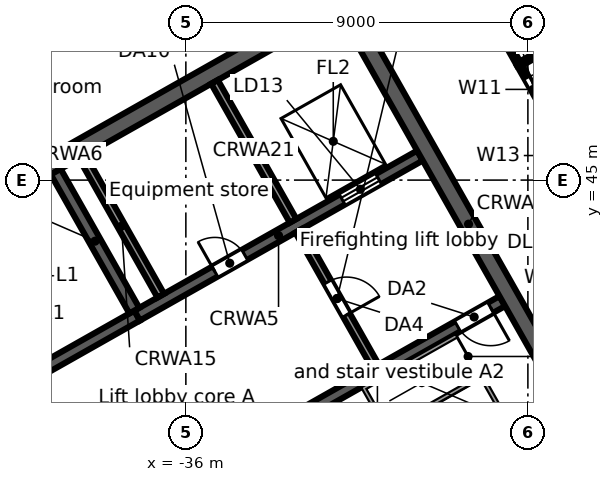
"""IFC4 building model, lengths in metres.
Left out: names, types, materials, properties, quantities, classifications, styles, units other than length and angle.
Written with IfcOpenShell. Run it as: python <this file> out.ifc"""

import sys

from ifc_helpers import new_model, si_unit, direction, frame, frame_2d, origin, place, context, subcontext, project, spatial, rectangle, extrude, element, fill, save


model = new_model("IFC4")
c1 = context("Model", 3, precision=1e-05, world=origin(), true_north=direction((0.0, 1.0)))
c2 = subcontext(c1, "Body", "Model", "MODEL_VIEW")
j1 = project(units=[si_unit("LENGTHUNIT", "METRE"), si_unit("PLANEANGLEUNIT", "RADIAN")], contexts=[c1])
p1 = place(None, origin())
s1 = spatial("IfcSite", under=j1, at=p1, CompositionType="ELEMENT")
p2 = place(p1, origin())
s2 = spatial("IfcBuilding", under=s1, at=p2, CompositionType="ELEMENT")
p3 = place(p2, frame((0.0, 0.0, 219.2)))
s3 = spatial("IfcBuildingStorey", under=s2, at=p3, CompositionType="ELEMENT", Elevation=219.2)
p4 = place(p3, frame((-0.046, 47.974, 0.0), z_axis=(0.0, 0.0, 1.0), x_axis=(-0.870356579543, -0.492421998337, 0.0)))
e1 = element("IfcWall", 1, at=p4, inside=s3, PredefinedType="STANDARD", context=c2, shape_type="SweptSolid", body=[
    extrude(rectangle(XDim=43.754, YDim=0.25, at=frame_2d((21.877, 0.0))), origin(), (0.0, 0.0, 1.0), 3.62),
])
p5 = place(p4, frame((41.061, 0.0, 0.8)))
e2 = element("IfcOpeningElement", 2, at=p5, cuts=e1, PredefinedType="OPENING", context=c2, shape_type="SweptSolid", body=[
    extrude(rectangle(XDim=2.4, YDim=2.2, at=frame_2d((1.2, 1.1))), frame((0.0, 0.135, 0.0), z_axis=(0.0, -1.0, 0.0), x_axis=(1.0, 0.0, 0.0)), (0.0, 0.0, 1.0), 0.27),
])
p6 = place(p4, frame((38.443, 0.0, 0.0)))
e3 = element("IfcOpeningElement", 3, at=p6, cuts=e1, PredefinedType="OPENING", context=c2, shape_type="SweptSolid", body=[
    extrude(rectangle(XDim=1.8, YDim=2.4, at=frame_2d((0.9, 1.2))), frame((0.0, 0.135, 0.0), z_axis=(0.0, -1.0, 0.0), x_axis=(1.0, 0.0, 0.0)), (0.0, 0.0, 1.0), 0.27),
])
p7 = place(p4, frame((35.225, 0.0, 0.8)))
e4 = element("IfcOpeningElement", 4, at=p7, cuts=e1, PredefinedType="OPENING", context=c2, shape_type="SweptSolid", body=[
    extrude(rectangle(XDim=2.4, YDim=2.2, at=frame_2d((1.2, 1.1))), frame((0.0, 0.135, 0.0), z_axis=(0.0, -1.0, 0.0), x_axis=(1.0, 0.0, 0.0)), (0.0, 0.0, 1.0), 0.27),
])
p8 = place(p4, frame((32.307, 0.0, 0.8)))
e5 = element("IfcOpeningElement", 5, at=p8, cuts=e1, PredefinedType="OPENING", context=c2, shape_type="SweptSolid", body=[
    extrude(rectangle(XDim=2.4, YDim=2.2, at=frame_2d((1.2, 1.1))), frame((0.0, 0.135, 0.0), z_axis=(0.0, -1.0, 0.0), x_axis=(1.0, 0.0, 0.0)), (0.0, 0.0, 1.0), 0.27),
])
p9 = place(p4, frame((29.688, 0.0, 0.0)))
e6 = element("IfcOpeningElement", 6, at=p9, cuts=e1, PredefinedType="OPENING", context=c2, shape_type="SweptSolid", body=[
    extrude(rectangle(XDim=1.8, YDim=2.4, at=frame_2d((0.9, 1.2))), frame((0.0, 0.135, 0.0), z_axis=(0.0, -1.0, 0.0), x_axis=(1.0, 0.0, 0.0)), (0.0, 0.0, 1.0), 0.27),
])
p10 = place(p4, frame((26.47, 0.0, 0.8)))
e7 = element("IfcOpeningElement", 7, at=p10, cuts=e1, PredefinedType="OPENING", context=c2, shape_type="SweptSolid", body=[
    extrude(rectangle(XDim=2.4, YDim=2.2, at=frame_2d((1.2, 1.1))), frame((0.0, 0.135, 0.0), z_axis=(0.0, -1.0, 0.0), x_axis=(1.0, 0.0, 0.0)), (0.0, 0.0, 1.0), 0.27),
])
p11 = place(p4, frame((23.552, 0.0, 0.8)))
e8 = element("IfcOpeningElement", 8, at=p11, cuts=e1, PredefinedType="OPENING", context=c2, shape_type="SweptSolid", body=[
    extrude(rectangle(XDim=2.4, YDim=2.2, at=frame_2d((1.2, 1.1))), frame((0.0, 0.135, 0.0), z_axis=(0.0, -1.0, 0.0), x_axis=(1.0, 0.0, 0.0)), (0.0, 0.0, 1.0), 0.27),
])
p12 = place(p4, frame((20.934, 0.0, 0.0)))
e9 = element("IfcOpeningElement", 9, at=p12, cuts=e1, PredefinedType="OPENING", context=c2, shape_type="SweptSolid", body=[
    extrude(rectangle(XDim=1.8, YDim=2.4, at=frame_2d((0.9, 1.2))), frame((0.0, 0.135, 0.0), z_axis=(0.0, -1.0, 0.0), x_axis=(1.0, 0.0, 0.0)), (0.0, 0.0, 1.0), 0.27),
])
p13 = place(p4, frame((17.716, 0.0, 0.8)))
e10 = element("IfcOpeningElement", 10, at=p13, cuts=e1, PredefinedType="OPENING", context=c2, shape_type="SweptSolid", body=[
    extrude(rectangle(XDim=2.4, YDim=2.2, at=frame_2d((1.2, 1.1))), frame((0.0, 0.135, 0.0), z_axis=(0.0, -1.0, 0.0), x_axis=(1.0, 0.0, 0.0)), (0.0, 0.0, 1.0), 0.27),
])
p14 = place(p4, frame((14.798, 0.0, 0.8)))
e11 = element("IfcOpeningElement", 11, at=p14, cuts=e1, PredefinedType="OPENING", context=c2, shape_type="SweptSolid", body=[
    extrude(rectangle(XDim=2.4, YDim=2.2, at=frame_2d((1.2, 1.1))), frame((0.0, 0.135, 0.0), z_axis=(0.0, -1.0, 0.0), x_axis=(1.0, 0.0, 0.0)), (0.0, 0.0, 1.0), 0.27),
])
p15 = place(p4, frame((12.179, 0.0, 0.0)))
e12 = element("IfcOpeningElement", 12, at=p15, cuts=e1, PredefinedType="OPENING", context=c2, shape_type="SweptSolid", body=[
    extrude(rectangle(XDim=1.8, YDim=2.4, at=frame_2d((0.9, 1.2))), frame((0.0, 0.135, 0.0), z_axis=(0.0, -1.0, 0.0), x_axis=(1.0, 0.0, 0.0)), (0.0, 0.0, 1.0), 0.27),
])
p16 = place(p4, frame((8.961, 0.0, 0.8)))
e13 = element("IfcOpeningElement", 13, at=p16, cuts=e1, PredefinedType="OPENING", context=c2, shape_type="SweptSolid", body=[
    extrude(rectangle(XDim=2.4, YDim=2.2, at=frame_2d((1.2, 1.1))), frame((0.0, 0.135, 0.0), z_axis=(0.0, -1.0, 0.0), x_axis=(1.0, 0.0, 0.0)), (0.0, 0.0, 1.0), 0.27),
])
p17 = place(p4, frame((6.043, 0.0, 0.8)))
e14 = element("IfcOpeningElement", 14, at=p17, cuts=e1, PredefinedType="OPENING", context=c2, shape_type="SweptSolid", body=[
    extrude(rectangle(XDim=2.4, YDim=2.2, at=frame_2d((1.2, 1.1))), frame((0.0, 0.135, 0.0), z_axis=(0.0, -1.0, 0.0), x_axis=(1.0, 0.0, 0.0)), (0.0, 0.0, 1.0), 0.27),
])
p18 = place(p4, frame((3.425, 0.0, 0.0)))
e15 = element("IfcOpeningElement", 15, at=p18, cuts=e1, PredefinedType="OPENING", context=c2, shape_type="SweptSolid", body=[
    extrude(rectangle(XDim=1.8, YDim=2.4, at=frame_2d((0.9, 1.2))), frame((0.0, 0.135, 0.0), z_axis=(0.0, -1.0, 0.0), x_axis=(1.0, 0.0, 0.0)), (0.0, 0.0, 1.0), 0.27),
])
p19 = place(p4, frame((0.207, 0.0, 0.8)))
e16 = element("IfcOpeningElement", 16, at=p19, cuts=e1, PredefinedType="OPENING", context=c2, shape_type="SweptSolid", body=[
    extrude(rectangle(XDim=2.4, YDim=2.2, at=frame_2d((1.2, 1.1))), frame((0.0, 0.135, 0.0), z_axis=(0.0, -1.0, 0.0), x_axis=(1.0, 0.0, 0.0)), (0.0, 0.0, 1.0), 0.27),
])
p20 = place(p3, frame((-58.732, 38.771, 0.0), z_axis=(0.0, 0.0, 1.0), x_axis=(0.870354824205, 0.492425100887, 0.0)))
e17 = element("IfcWall", 17, at=p20, inside=s3, PredefinedType="STANDARD", context=c2, shape_type="SweptSolid", body=[
    extrude(rectangle(XDim=64.006, YDim=0.25, at=frame_2d((32.003, 0.0))), origin(), (0.0, 0.0, 1.0), 3.62),
])
p21 = place(p20, frame((61.259, 0.0, 0.8)))
e18 = element("IfcOpeningElement", 18, at=p21, cuts=e17, PredefinedType="OPENING", context=c2, shape_type="SweptSolid", body=[
    extrude(rectangle(XDim=2.4, YDim=2.2, at=frame_2d((1.2, 1.1))), frame((0.0, 0.135, 0.0), z_axis=(0.0, -1.0, 0.0), x_axis=(1.0, 0.0, 0.0)), (0.0, 0.0, 1.0), 0.27),
])
p22 = place(p20, frame((58.216, 0.0, 0.8)))
e19 = element("IfcOpeningElement", 19, at=p22, cuts=e17, PredefinedType="OPENING", context=c2, shape_type="SweptSolid", body=[
    extrude(rectangle(XDim=2.4, YDim=2.2, at=frame_2d((1.2, 1.1))), frame((0.0, 0.135, 0.0), z_axis=(0.0, -1.0, 0.0), x_axis=(1.0, 0.0, 0.0)), (0.0, 0.0, 1.0), 0.27),
])
p23 = place(p20, frame((55.173, 0.0, 0.8)))
e20 = element("IfcOpeningElement", 20, at=p23, cuts=e17, PredefinedType="OPENING", context=c2, shape_type="SweptSolid", body=[
    extrude(rectangle(XDim=2.4, YDim=2.2, at=frame_2d((1.2, 1.1))), frame((0.0, 0.135, 0.0), z_axis=(0.0, -1.0, 0.0), x_axis=(1.0, 0.0, 0.0)), (0.0, 0.0, 1.0), 0.27),
])
p24 = place(p20, frame((52.129, 0.0, 0.8)))
e21 = element("IfcOpeningElement", 21, at=p24, cuts=e17, PredefinedType="OPENING", context=c2, shape_type="SweptSolid", body=[
    extrude(rectangle(XDim=2.4, YDim=2.2, at=frame_2d((1.2, 1.1))), frame((0.0, 0.135, 0.0), z_axis=(0.0, -1.0, 0.0), x_axis=(1.0, 0.0, 0.0)), (0.0, 0.0, 1.0), 0.27),
])
p25 = place(p20, frame((49.086, 0.0, 0.8)))
e22 = element("IfcOpeningElement", 22, at=p25, cuts=e17, PredefinedType="OPENING", context=c2, shape_type="SweptSolid", body=[
    extrude(rectangle(XDim=2.4, YDim=2.2, at=frame_2d((1.2, 1.1))), frame((0.0, 0.135, 0.0), z_axis=(0.0, -1.0, 0.0), x_axis=(1.0, 0.0, 0.0)), (0.0, 0.0, 1.0), 0.27),
])
p26 = place(p20, frame((46.043, 0.0, 0.8)))
e23 = element("IfcOpeningElement", 23, at=p26, cuts=e17, PredefinedType="OPENING", context=c2, shape_type="SweptSolid", body=[
    extrude(rectangle(XDim=2.4, YDim=2.2, at=frame_2d((1.2, 1.1))), frame((0.0, 0.135, 0.0), z_axis=(0.0, -1.0, 0.0), x_axis=(1.0, 0.0, 0.0)), (0.0, 0.0, 1.0), 0.27),
])
p27 = place(p20, frame((43.0, 0.0, 0.8)))
e24 = element("IfcOpeningElement", 24, at=p27, cuts=e17, PredefinedType="OPENING", context=c2, shape_type="SweptSolid", body=[
    extrude(rectangle(XDim=2.4, YDim=2.2, at=frame_2d((1.2, 1.1))), frame((0.0, 0.135, 0.0), z_axis=(0.0, -1.0, 0.0), x_axis=(1.0, 0.0, 0.0)), (0.0, 0.0, 1.0), 0.27),
])
p28 = place(p20, frame((39.956, 0.0, 0.8)))
e25 = element("IfcOpeningElement", 25, at=p28, cuts=e17, PredefinedType="OPENING", context=c2, shape_type="SweptSolid", body=[
    extrude(rectangle(XDim=2.4, YDim=2.2, at=frame_2d((1.2, 1.1))), frame((0.0, 0.135, 0.0), z_axis=(0.0, -1.0, 0.0), x_axis=(1.0, 0.0, 0.0)), (0.0, 0.0, 1.0), 0.27),
])
p29 = place(p20, frame((36.913, 0.0, 0.8)))
e26 = element("IfcOpeningElement", 26, at=p29, cuts=e17, PredefinedType="OPENING", context=c2, shape_type="SweptSolid", body=[
    extrude(rectangle(XDim=2.4, YDim=2.2, at=frame_2d((1.2, 1.1))), frame((0.0, 0.135, 0.0), z_axis=(0.0, -1.0, 0.0), x_axis=(1.0, 0.0, 0.0)), (0.0, 0.0, 1.0), 0.27),
])
p30 = place(p20, frame((33.87, 0.0, 0.8)))
e27 = element("IfcOpeningElement", 27, at=p30, cuts=e17, PredefinedType="OPENING", context=c2, shape_type="SweptSolid", body=[
    extrude(rectangle(XDim=2.4, YDim=2.2, at=frame_2d((1.2, 1.1))), frame((0.0, 0.135, 0.0), z_axis=(0.0, -1.0, 0.0), x_axis=(1.0, 0.0, 0.0)), (0.0, 0.0, 1.0), 0.27),
])
p31 = place(p20, frame((30.826, 0.0, 0.8)))
e28 = element("IfcOpeningElement", 28, at=p31, cuts=e17, PredefinedType="OPENING", context=c2, shape_type="SweptSolid", body=[
    extrude(rectangle(XDim=2.4, YDim=2.2, at=frame_2d((1.2, 1.1))), frame((0.0, 0.135, 0.0), z_axis=(0.0, -1.0, 0.0), x_axis=(1.0, 0.0, 0.0)), (0.0, 0.0, 1.0), 0.27),
])
p32 = place(p20, frame((27.783, 0.0, 0.8)))
e29 = element("IfcOpeningElement", 29, at=p32, cuts=e17, PredefinedType="OPENING", context=c2, shape_type="SweptSolid", body=[
    extrude(rectangle(XDim=2.4, YDim=2.2, at=frame_2d((1.2, 1.1))), frame((0.0, 0.135, 0.0), z_axis=(0.0, -1.0, 0.0), x_axis=(1.0, 0.0, 0.0)), (0.0, 0.0, 1.0), 0.27),
])
p33 = place(p20, frame((24.74, 0.0, 0.8)))
e30 = element("IfcOpeningElement", 30, at=p33, cuts=e17, PredefinedType="OPENING", context=c2, shape_type="SweptSolid", body=[
    extrude(rectangle(XDim=2.4, YDim=2.2, at=frame_2d((1.2, 1.1))), frame((0.0, 0.135, 0.0), z_axis=(0.0, -1.0, 0.0), x_axis=(1.0, 0.0, 0.0)), (0.0, 0.0, 1.0), 0.27),
])
p34 = place(p20, frame((21.696, 0.0, 0.8)))
e31 = element("IfcOpeningElement", 31, at=p34, cuts=e17, PredefinedType="OPENING", context=c2, shape_type="SweptSolid", body=[
    extrude(rectangle(XDim=2.4, YDim=2.2, at=frame_2d((1.2, 1.1))), frame((0.0, 0.135, 0.0), z_axis=(0.0, -1.0, 0.0), x_axis=(1.0, 0.0, 0.0)), (0.0, 0.0, 1.0), 0.27),
])
p35 = place(p20, frame((18.653, 0.0, 0.8)))
e32 = element("IfcOpeningElement", 32, at=p35, cuts=e17, PredefinedType="OPENING", context=c2, shape_type="SweptSolid", body=[
    extrude(rectangle(XDim=2.4, YDim=2.2, at=frame_2d((1.2, 1.1))), frame((0.0, 0.135, 0.0), z_axis=(0.0, -1.0, 0.0), x_axis=(1.0, 0.0, 0.0)), (0.0, 0.0, 1.0), 0.27),
])
p36 = place(p20, frame((15.61, 0.0, 0.8)))
e33 = element("IfcOpeningElement", 33, at=p36, cuts=e17, PredefinedType="OPENING", context=c2, shape_type="SweptSolid", body=[
    extrude(rectangle(XDim=2.4, YDim=2.2, at=frame_2d((1.2, 1.1))), frame((0.0, 0.135, 0.0), z_axis=(0.0, -1.0, 0.0), x_axis=(1.0, 0.0, 0.0)), (0.0, 0.0, 1.0), 0.27),
])
p37 = place(p20, frame((12.567, 0.0, 0.8)))
e34 = element("IfcOpeningElement", 34, at=p37, cuts=e17, PredefinedType="OPENING", context=c2, shape_type="SweptSolid", body=[
    extrude(rectangle(XDim=2.4, YDim=2.2, at=frame_2d((1.2, 1.1))), frame((0.0, 0.135, 0.0), z_axis=(0.0, -1.0, 0.0), x_axis=(1.0, 0.0, 0.0)), (0.0, 0.0, 1.0), 0.27),
])
p38 = place(p20, frame((9.523, 0.0, 0.8)))
e35 = element("IfcOpeningElement", 35, at=p38, cuts=e17, PredefinedType="OPENING", context=c2, shape_type="SweptSolid", body=[
    extrude(rectangle(XDim=2.4, YDim=2.2, at=frame_2d((1.2, 1.1))), frame((0.0, 0.135, 0.0), z_axis=(0.0, -1.0, 0.0), x_axis=(1.0, 0.0, 0.0)), (0.0, 0.0, 1.0), 0.27),
])
p39 = place(p20, frame((6.48, 0.0, 0.8)))
e36 = element("IfcOpeningElement", 36, at=p39, cuts=e17, PredefinedType="OPENING", context=c2, shape_type="SweptSolid", body=[
    extrude(rectangle(XDim=2.4, YDim=2.2, at=frame_2d((1.2, 1.1))), frame((0.0, 0.135, 0.0), z_axis=(0.0, -1.0, 0.0), x_axis=(1.0, 0.0, 0.0)), (0.0, 0.0, 1.0), 0.27),
])
p40 = place(p20, frame((3.437, 0.0, 0.8)))
e37 = element("IfcOpeningElement", 37, at=p40, cuts=e17, PredefinedType="OPENING", context=c2, shape_type="SweptSolid", body=[
    extrude(rectangle(XDim=2.4, YDim=2.2, at=frame_2d((1.2, 1.1))), frame((0.0, 0.135, 0.0), z_axis=(0.0, -1.0, 0.0), x_axis=(1.0, 0.0, 0.0)), (0.0, 0.0, 1.0), 0.27),
])
p41 = place(p20, frame((0.393, 0.0, 0.8)))
e38 = element("IfcOpeningElement", 38, at=p41, cuts=e17, PredefinedType="OPENING", context=c2, shape_type="SweptSolid", body=[
    extrude(rectangle(XDim=2.4, YDim=2.2, at=frame_2d((1.2, 1.1))), frame((0.0, 0.135, 0.0), z_axis=(0.0, -1.0, 0.0), x_axis=(1.0, 0.0, 0.0)), (0.0, 0.0, 1.0), 0.27),
])
p42 = place(p3, frame((-34.245, 38.097, 0.0), z_axis=(0.0, 0.0, 1.0), x_axis=(0.870360409231, 0.492415229297, 0.0)))
e39 = element("IfcWall", 39, at=p42, inside=s3, PredefinedType="SOLIDWALL", context=c2, shape_type="SweptSolid", body=[
    extrude(rectangle(XDim=7.55, YDim=0.3, at=frame_2d((3.775, 0.0))), origin(), (0.0, 0.0, 1.0), 3.62),
])
p43 = place(p42, frame((6.2, 0.0, 0.0)))
e40 = element("IfcOpeningElement", 40, at=p43, cuts=e39, PredefinedType="OPENING", context=c2, shape_type="SweptSolid", body=[
    extrude(rectangle(XDim=1.0, YDim=2.1, at=frame_2d((0.5, 1.05))), frame((0.0, 0.16, 0.0), z_axis=(0.0, -1.0, 0.0), x_axis=(1.0, 0.0, 0.0)), (0.0, 0.0, 1.0), 0.32),
])
p44 = place(p3, frame((-43.853, 37.717, 0.0), z_axis=(0.0, 0.0, 1.0), x_axis=(0.870360409231, 0.492415229297, 0.0)))
e41 = element("IfcWall", 41, at=p44, inside=s3, PredefinedType="SOLIDWALL", context=c2, shape_type="SweptSolid", body=[
    extrude(rectangle(XDim=7.55, YDim=0.3, at=frame_2d((3.775, 0.0))), origin(), (0.0, 0.0, 1.0), 3.62),
])
p45 = place(p44, frame((0.35, 0.0, 0.0)))
e42 = element("IfcOpeningElement", 42, at=p45, cuts=e41, PredefinedType="OPENING", context=c2, shape_type="SweptSolid", body=[
    extrude(rectangle(XDim=1.0, YDim=2.1, at=frame_2d((0.5, 1.05))), frame((0.0, 0.16, 0.0), z_axis=(0.0, -1.0, 0.0), x_axis=(1.0, 0.0, 0.0)), (0.0, 0.0, 1.0), 0.32),
])
p46 = place(p3, frame((-37.282, 41.435, 0.0), z_axis=(0.0, 0.0, 1.0), x_axis=(0.870352688754, 0.492428875248, 0.0)))
e43 = element("IfcWall", 43, at=p46, inside=s3, PredefinedType="SOLIDWALL", context=c2, shape_type="SweptSolid", body=[
    extrude(rectangle(XDim=8.55, YDim=0.3, at=frame_2d((4.275, 0.0))), origin(), (0.0, 0.0, 1.0), 3.62),
])
p47 = place(p46, frame((6.2, 0.0, 0.0)))
e44 = element("IfcOpeningElement", 44, at=p47, cuts=e43, PredefinedType="OPENING", context=c2, shape_type="SweptSolid", body=[
    extrude(rectangle(XDim=1.1, YDim=2.1, at=frame_2d((0.55, 1.05))), frame((0.0, 0.16, 0.0), z_axis=(0.0, -1.0, 0.0), x_axis=(1.0, 0.0, 0.0)), (0.0, 0.0, 1.0), 0.32),
])
p48 = place(p46, frame((2.35, 0.0, 0.0)))
e45 = element("IfcOpeningElement", 45, at=p48, cuts=e43, PredefinedType="OPENING", context=c2, shape_type="SweptSolid", body=[
    extrude(rectangle(XDim=0.9, YDim=2.1, at=frame_2d((0.45, 1.05))), frame((0.0, 0.16, 0.0), z_axis=(0.0, -1.0, 0.0), x_axis=(1.0, 0.0, 0.0)), (0.0, 0.0, 1.0), 0.32),
])
p49 = place(p3, frame((-46.498, 41.477, 0.0), z_axis=(0.0, 0.0, 1.0), x_axis=(0.870359753402, 0.492416388494, 0.0)))
e46 = element("IfcWall", 46, at=p49, inside=s3, PredefinedType="SOLIDWALL", context=c2, shape_type="SweptSolid", body=[
    extrude(rectangle(XDim=17.0, YDim=0.45, at=frame_2d((8.5, 0.0))), origin(), (0.0, 0.0, 1.0), 3.62),
])
p50 = place(p3, frame((-40.516, 39.433, 0.0), z_axis=(0.0, 0.0, 1.0), x_axis=(0.492453559952, -0.87033872216, 0.0)))
e47 = element("IfcWall", 47, at=p50, inside=s3, PredefinedType="PARTITIONING", context=c2, shape_type="SweptSolid", body=[
    extrude(rectangle(XDim=4.1, YDim=0.2, at=frame_2d((2.05, 0.0))), origin(), (0.0, 0.0, 1.0), 3.62),
])
p51 = place(p50, frame((1.55, 0.0, 0.0)))
e48 = element("IfcOpeningElement", 48, at=p51, cuts=e47, PredefinedType="OPENING", context=c2, shape_type="SweptSolid", body=[
    extrude(rectangle(XDim=1.0, YDim=2.1, at=frame_2d((0.5, 1.05))), frame((0.0, 0.11, 0.0), z_axis=(0.0, -1.0, 0.0), x_axis=(1.0, 0.0, 0.0)), (0.0, 0.0, 1.0), 0.22),
])
p52 = place(p3, frame((-39.424, 45.22, 0.0), z_axis=(0.0, 0.0, 1.0), x_axis=(0.492409653846, -0.870363563575, 0.0)))
e49 = element("IfcWall", 49, at=p52, inside=s3, PredefinedType="SOLIDWALL", context=c2, shape_type="SweptSolid", body=[
    extrude(rectangle(XDim=4.2, YDim=0.3, at=frame_2d((2.1, 0.0))), origin(), (0.0, 0.0, 1.0), 3.62),
])
p53 = place(p3, frame((-38.728, 45.615, 0.0), z_axis=(0.0, 0.0, 1.0), x_axis=(0.492409653846, -0.870363563575, 0.0)))
e50 = element("IfcWall", 50, at=p53, inside=s3, PredefinedType="SOLIDWALL", context=c2, shape_type="SweptSolid", body=[
    extrude(rectangle(XDim=4.2, YDim=0.2, at=frame_2d((2.1, 0.0))), origin(), (0.0, 0.0, 1.0), 3.62),
])
p54 = place(p3, frame((-33.031, 43.667, 0.0), z_axis=(0.0, 0.0, 1.0), x_axis=(0.492408451753, -0.87036424366, 0.0)))
e51 = element("IfcWall", 51, at=p54, inside=s3, PredefinedType="PARTITIONING", context=c2, shape_type="SweptSolid", body=[
    extrude(rectangle(XDim=4.1, YDim=0.2, at=frame_2d((2.05, 0.0))), origin(), (0.0, 0.0, 1.0), 3.62),
])
p55 = place(p54, frame((1.55, 0.0, 0.0)))
e52 = element("IfcOpeningElement", 52, at=p55, cuts=e51, PredefinedType="OPENING", context=c2, shape_type="SweptSolid", body=[
    extrude(rectangle(XDim=1.0, YDim=2.1, at=frame_2d((0.5, 1.05))), frame((0.0, 0.11, 0.0), z_axis=(0.0, -1.0, 0.0), x_axis=(1.0, 0.0, 0.0)), (0.0, 0.0, 1.0), 0.22),
])
p56 = place(p3, frame((-35.246, 47.584, 0.0), z_axis=(0.0, 0.0, 1.0), x_axis=(0.492409653846, -0.870363563575, 0.0)))
e53 = element("IfcWall", 53, at=p56, inside=s3, PredefinedType="SOLIDWALL", context=c2, shape_type="SweptSolid", body=[
    extrude(rectangle(XDim=4.2, YDim=0.2, at=frame_2d((2.1, 0.0))), origin(), (0.0, 0.0, 1.0), 3.62),
])
p57 = place(p3, frame((-31.787, 49.542, 0.0), z_axis=(0.0, 0.0, 1.0), x_axis=(0.492421378713, -0.870356930107, 0.0)))
e54 = element("IfcWall", 54, at=p57, inside=s3, PredefinedType="SOLIDWALL", context=c2, shape_type="SweptSolid", body=[
    extrude(rectangle(XDim=13.1, YDim=0.45, at=frame_2d((6.55, 0.0))), origin(), (0.0, 0.0, 1.0), 3.62),
])
p58 = place(p3, frame((-29.201, 51.521, 0.0), z_axis=(0.0, 0.0, 1.0), x_axis=(0.492340861121, -0.870402479587, 0.0)))
e55 = element("IfcWall", 55, at=p58, inside=s3, PredefinedType="PARTITIONING", context=c2, shape_type="SweptSolid", body=[
    extrude(rectangle(XDim=3.999, YDim=0.125, at=frame_2d((2.0, 0.0))), origin(), (0.0, 0.0, 1.0), 3.62),
])
p59 = place(p58, frame((1.45, 0.0, 0.0)))
e56 = element("IfcOpeningElement", 56, at=p59, cuts=e55, PredefinedType="OPENING", context=c2, shape_type="SweptSolid", body=[
    extrude(rectangle(XDim=0.9, YDim=2.1, at=frame_2d((0.45, 1.05))), frame((0.0, 0.073, 0.0), z_axis=(0.0, -1.0, 0.0), x_axis=(1.0, 0.0, 0.0)), (0.0, 0.0, 1.0), 0.145),
])
p60 = place(p3, frame((-27.232, 48.04, 0.0), z_axis=(0.0, 0.0, 1.0), x_axis=(0.492437810475, -0.870347633314, 0.0)))
e57 = element("IfcWall", 57, at=p60, inside=s3, PredefinedType="PARTITIONING", context=c2, shape_type="SweptSolid", body=[
    extrude(rectangle(XDim=1.501, YDim=0.125, at=frame_2d((0.75, 0.0))), origin(), (0.0, 0.0, 1.0), 3.62),
])
p61 = place(p60, frame((0.4, 0.0, 0.0)))
e58 = element("IfcOpeningElement", 58, at=p61, cuts=e57, PredefinedType="OPENING", context=c2, shape_type="SweptSolid", body=[
    extrude(rectangle(XDim=0.9, YDim=2.1, at=frame_2d((0.45, 1.05))), frame((0.0, 0.073, 0.0), z_axis=(0.0, -1.0, 0.0), x_axis=(1.0, 0.0, 0.0)), (0.0, 0.0, 1.0), 0.145),
])
p62 = place(p3, frame((-27.232, 48.04, 0.0), z_axis=(0.0, 0.0, 1.0), x_axis=(0.870339461844, 0.492452252668, 0.0)))
e59 = element("IfcWall", 59, at=p62, inside=s3, PredefinedType="PARTITIONING", context=c2, shape_type="SweptSolid", body=[
    extrude(rectangle(XDim=5.091, YDim=0.125, at=frame_2d((2.545, 0.0))), origin(), (0.0, 0.0, 1.0), 2.892),
])
p63 = place(p47, origin())
e60 = element("IfcDoor", 60, at=p63, inside=s3, OperationType="DOUBLE_DOOR_SLIDING", PredefinedType="DOOR", context=c2, shape_type="SweptSolid", body=[
    extrude(rectangle(XDim=1.1, YDim=2.1, at=frame_2d((0.55, 1.05))), frame((0.0, 0.025, 0.0), z_axis=(0.0, -1.0, 0.0), x_axis=(1.0, 0.0, 0.0)), (0.0, 0.0, 1.0), 0.05),
])
fill(e44, e60)
p64 = place(p43, frame((1.0, 0.0, 0.0), z_axis=(0.0, 0.0, 1.0), x_axis=(-1.0, 0.0, 0.0)))
e61 = element("IfcDoor", 61, at=p64, inside=s3, OperationType="SINGLE_SWING_LEFT", PredefinedType="DOOR", context=c2, shape_type="SweptSolid", body=[
    extrude(rectangle(XDim=1.0, YDim=2.1, at=frame_2d((0.5, 1.05))), frame((0.0, 0.025, 0.0), z_axis=(0.0, -1.0, 0.0), x_axis=(1.0, 0.0, 0.0)), (0.0, 0.0, 1.0), 0.05),
])
fill(e40, e61)
p65 = place(p55, origin())
e62 = element("IfcDoor", 62, at=p65, inside=s3, OperationType="SINGLE_SWING_RIGHT", PredefinedType="DOOR", context=c2, shape_type="SweptSolid", body=[
    extrude(rectangle(XDim=1.0, YDim=2.1, at=frame_2d((0.5, 1.05))), frame((0.0, 0.025, 0.0), z_axis=(0.0, -1.0, 0.0), x_axis=(1.0, 0.0, 0.0)), (0.0, 0.0, 1.0), 0.05),
])
fill(e52, e62)
p66 = place(p48, origin())
e63 = element("IfcDoor", 63, at=p66, inside=s3, OperationType="SINGLE_SWING_LEFT", PredefinedType="DOOR", context=c2, shape_type="SweptSolid", body=[
    extrude(rectangle(XDim=0.9, YDim=2.1, at=frame_2d((0.45, 1.05))), frame((0.0, 0.025, 0.0), z_axis=(0.0, -1.0, 0.0), x_axis=(1.0, 0.0, 0.0)), (0.0, 0.0, 1.0), 0.05),
])
fill(e45, e63)
p67 = place(p61, origin())
e64 = element("IfcDoor", 64, at=p67, inside=s3, OperationType="SINGLE_SWING_RIGHT", PredefinedType="DOOR", context=c2, shape_type="SweptSolid", body=[
    extrude(rectangle(XDim=0.9, YDim=2.1, at=frame_2d((0.45, 1.05))), frame((0.0, 0.025, 0.0), z_axis=(0.0, -1.0, 0.0), x_axis=(1.0, 0.0, 0.0)), (0.0, 0.0, 1.0), 0.05),
])
fill(e58, e64)
save(model, sys.argv[1])
